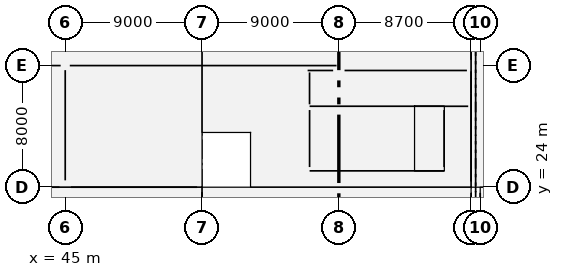
"""IFC4 building model, lengths in metres.
Left out: names, types, materials, properties, quantities, classifications, styles, units other than length and angle.
Written with IfcOpenShell. Run it as: python <this file> out.ifc"""

import sys

from ifc_helpers import new_model, si_unit, direction, frame, frame_2d, origin, origin_2d, place, context, subcontext, project, spatial, rectangle, extrude, element, fill, save


model = new_model("IFC4")
c1 = context("Model", 3, precision=1e-05, world=origin(), true_north=direction((0.0, 1.0)))
c2 = subcontext(c1, "Body", "Model", "MODEL_VIEW")
j1 = project(units=[si_unit("LENGTHUNIT", "METRE"), si_unit("PLANEANGLEUNIT", "RADIAN")], contexts=[c1])
p1 = place(None, origin())
s1 = spatial("IfcSite", under=j1, at=p1, CompositionType="ELEMENT")
p2 = place(p1, origin())
s2 = spatial("IfcBuilding", under=s1, at=p2, CompositionType="ELEMENT")
p3 = place(p2, origin())
s3 = spatial("IfcBuildingStorey", under=s2, at=p3, CompositionType="ELEMENT", Elevation=0.0)
for number, where, z_axis, x_axis in (
    (1, (45.0, 24.0, -0.5), (0.0, 0.0, 1.0), (1.0, 0.0, 0.0)),
    (2, (45.0, 32.0, -0.5), (0.0, 0.0, 1.0), (1.0, 0.0, 0.0)),
):
    element("IfcColumn", number, at=place(p3, frame(where, z_axis=z_axis, x_axis=x_axis)), inside=s3, PredefinedType="COLUMN", context=c2, shape_type="SweptSolid", body=[
        extrude(rectangle(XDim=0.75, YDim=0.75, at=origin_2d()), origin(), (0.0, 0.0, 1.0), 6.8),
    ])
p4 = place(p3, frame((54.0, 24.0, -0.5), z_axis=(0.0, 0.0, 1.0), x_axis=(1.0, 0.0, 0.0)))
e3 = element("IfcColumn", 3, at=p4, inside=s3, PredefinedType="COLUMN", context=c2, shape_type="SweptSolid", body=[
    extrude(rectangle(XDim=0.65, YDim=0.65, at=origin_2d()), origin(), (0.0, 0.0, 1.0), 6.8),
])
p5 = place(p3, frame((54.0, 32.0, -0.5), z_axis=(0.0, 0.0, 1.0), x_axis=(1.0, 0.0, 0.0)))
e4 = element("IfcColumn", 4, at=p5, inside=s3, PredefinedType="COLUMN", context=c2, shape_type="SweptSolid", body=[
    extrude(rectangle(XDim=0.75, YDim=0.75, at=origin_2d()), origin(), (0.0, 0.0, 1.0), 6.8),
])
p6 = place(p3, frame((63.0, 24.0, -0.5), z_axis=(0.0, 0.0, 1.0), x_axis=(1.0, 0.0, 0.0)))
e5 = element("IfcColumn", 5, at=p6, inside=s3, PredefinedType="COLUMN", context=c2, shape_type="SweptSolid", body=[
    extrude(rectangle(XDim=0.65, YDim=0.65, at=origin_2d()), origin(), (0.0, 0.0, 1.0), 6.8),
])
p7 = place(p3, frame((63.0, 32.0, -0.5), z_axis=(0.0, 0.0, 1.0), x_axis=(1.0, 0.0, 0.0)))
e6 = element("IfcColumn", 6, at=p7, inside=s3, PredefinedType="COLUMN", context=c2, shape_type="SweptSolid", body=[
    extrude(rectangle(XDim=0.75, YDim=0.75, at=origin_2d()), origin(), (0.0, 0.0, 1.0), 6.8),
])
for number, where, z_axis, x_axis in (
    (7, (71.7, 24.0, -0.5), (0.0, 0.0, 1.0), (1.0, 0.0, 0.0)),
    (8, (71.7, 32.0, -0.5), (0.0, 0.0, 1.0), (1.0, 0.0, 0.0)),
    (9, (72.3, 24.0, -0.5), (0.0, 0.0, 1.0), (1.0, 0.0, 0.0)),
):
    element("IfcColumn", number, at=place(p3, frame(where, z_axis=z_axis, x_axis=x_axis)), inside=s3, PredefinedType="COLUMN", context=c2, shape_type="SweptSolid", body=[
        extrude(rectangle(XDim=0.55, YDim=0.75, at=origin_2d()), origin(), (0.0, 0.0, 1.0), 6.8),
    ])
p8 = place(p3, frame((36.375, 24.0, 0.0), z_axis=(0.0, 0.0, 1.0), x_axis=(1.0, 0.0, 0.0)))
e10 = element("IfcWall", 10, at=p8, inside=s3, PredefinedType="SOLIDWALL", context=c2, shape_type="SweptSolid", body=[
    extrude(rectangle(XDim=8.25, YDim=0.38, at=frame_2d((4.125, 0.0))), origin(), (0.0, 0.0, 1.0), 5.08),
])
p9 = place(p3, frame((45.375, 24.0, 0.0), z_axis=(0.0, 0.0, 1.0), x_axis=(1.0, 0.0, 0.0)))
e11 = element("IfcWall", 11, at=p9, inside=s3, PredefinedType="SOLIDWALL", context=c2, shape_type="SweptSolid", body=[
    extrude(rectangle(XDim=8.3, YDim=0.38, at=frame_2d((4.15, 0.0))), origin(), (0.0, 0.0, 1.0), 5.08),
])
p10 = place(p9, frame((3.35, 0.0, 3.59)))
e12 = element("IfcOpeningElement", 12, at=p10, cuts=e11, PredefinedType="OPENING", context=c2, shape_type="SweptSolid", body=[
    extrude(rectangle(XDim=1.6, YDim=1.45, at=frame_2d((0.8, 0.725))), frame((0.0, 0.2, 0.0), z_axis=(0.0, -1.0, 0.0), x_axis=(1.0, 0.0, 0.0)), (0.0, 0.0, 1.0), 0.4),
])
p11 = place(p3, frame((71.7, 24.375, 0.0), z_axis=(0.0, 0.0, 1.0), x_axis=(0.0, 1.0, 0.0)))
e13 = element("IfcWall", 13, at=p11, inside=s3, PredefinedType="SOLIDWALL", context=c2, shape_type="SweptSolid", body=[
    extrude(rectangle(XDim=5.8, YDim=0.38, at=frame_2d((2.9, 0.0))), origin(), (0.0, 0.0, 1.0), 5.08),
])
p12 = place(p11, frame((2.825, 0.0, 3.59)))
e14 = element("IfcOpeningElement", 14, at=p12, cuts=e13, PredefinedType="OPENING", context=c2, shape_type="SweptSolid", body=[
    extrude(rectangle(XDim=1.6, YDim=1.45, at=frame_2d((0.8, 0.725))), frame((0.0, 0.2, 0.0), z_axis=(0.0, -1.0, 0.0), x_axis=(1.0, 0.0, 0.0)), (0.0, 0.0, 1.0), 0.4),
])
p13 = place(p3, frame((71.7, 32.375, 0.0), z_axis=(0.0, 0.0, 1.0), x_axis=(0.0, 1.0, 0.0)))
e15 = element("IfcWall", 15, at=p13, inside=s3, PredefinedType="SOLIDWALL", context=c2, shape_type="SweptSolid", body=[
    extrude(rectangle(XDim=7.25, YDim=0.38, at=frame_2d((3.625, 0.0))), origin(), (0.0, 0.0, 1.0), 5.08),
])
p14 = place(p3, frame((54.0, 16.325, 0.0), z_axis=(0.0, 0.0, 1.0), x_axis=(0.0, 1.0, 0.0)))
e16 = element("IfcWall", 16, at=p14, inside=s3, PredefinedType="SOLIDWALL", context=c2, shape_type="SweptSolid", body=[
    extrude(rectangle(XDim=7.35, YDim=0.34, at=frame_2d((3.675, 0.0))), origin(), (0.0, 0.0, 1.0), 5.23),
])
p15 = place(p14, frame((1.55, 0.0, 0.85)))
e17 = element("IfcOpeningElement", 17, at=p15, cuts=e16, PredefinedType="OPENING", context=c2, shape_type="SweptSolid", body=[
    extrude(rectangle(XDim=1.8, YDim=3.15, at=frame_2d((0.9, 1.575))), frame((0.0, 0.18, 0.0), z_axis=(0.0, -1.0, 0.0), x_axis=(1.0, 0.0, 0.0)), (0.0, 0.0, 1.0), 0.36),
])
p16 = place(p14, frame((4.0, 0.0, 0.85)))
e18 = element("IfcOpeningElement", 18, at=p16, cuts=e16, PredefinedType="OPENING", context=c2, shape_type="SweptSolid", body=[
    extrude(rectangle(XDim=1.8, YDim=3.15, at=frame_2d((0.9, 1.575))), frame((0.0, 0.18, 0.0), z_axis=(0.0, -1.0, 0.0), x_axis=(1.0, 0.0, 0.0)), (0.0, 0.0, 1.0), 0.36),
])
p17 = place(p3, frame((71.7, 16.375, 0.0), z_axis=(0.0, 0.0, 1.0), x_axis=(0.0, 1.0, 0.0)))
e19 = element("IfcWall", 19, at=p17, inside=s3, PredefinedType="SOLIDWALL", context=c2, shape_type="SweptSolid", body=[
    extrude(rectangle(XDim=7.25, YDim=0.34, at=frame_2d((3.625, 0.0))), origin(), (0.0, 0.0, 1.0), 4.98),
])
p18 = place(p17, frame((1.517, 0.0, 0.85)))
e20 = element("IfcOpeningElement", 20, at=p18, cuts=e19, PredefinedType="OPENING", context=c2, shape_type="SweptSolid", body=[
    extrude(rectangle(XDim=1.8, YDim=3.15, at=frame_2d((0.9, 1.575))), frame((0.0, 0.18, 0.0), z_axis=(0.0, -1.0, 0.0), x_axis=(1.0, 0.0, 0.0)), (0.0, 0.0, 1.0), 0.36),
])
p19 = place(p17, frame((3.933, 0.0, 0.85)))
e21 = element("IfcOpeningElement", 21, at=p19, cuts=e19, PredefinedType="OPENING", context=c2, shape_type="SweptSolid", body=[
    extrude(rectangle(XDim=1.8, YDim=3.15, at=frame_2d((0.9, 1.575))), frame((0.0, 0.18, 0.0), z_axis=(0.0, -1.0, 0.0), x_axis=(1.0, 0.0, 0.0)), (0.0, 0.0, 1.0), 0.36),
])
p20 = place(p3, frame((72.3, 16.375, 0.0), z_axis=(0.0, 0.0, 1.0), x_axis=(0.0, 1.0, 0.0)))
e22 = element("IfcWall", 22, at=p20, inside=s3, PredefinedType="SOLIDWALL", context=c2, shape_type="SweptSolid", body=[
    extrude(rectangle(XDim=7.25, YDim=0.34, at=frame_2d((3.625, 0.0))), origin(), (0.0, 0.0, 1.0), 5.1),
])
p21 = place(p20, frame((1.517, 0.0, 0.85)))
e23 = element("IfcOpeningElement", 23, at=p21, cuts=e22, PredefinedType="OPENING", context=c2, shape_type="SweptSolid", body=[
    extrude(rectangle(XDim=1.8, YDim=3.15, at=frame_2d((0.9, 1.575))), frame((0.0, 0.18, 0.0), z_axis=(0.0, -1.0, 0.0), x_axis=(1.0, 0.0, 0.0)), (0.0, 0.0, 1.0), 0.36),
])
p22 = place(p20, frame((3.933, 0.0, 0.85)))
e24 = element("IfcOpeningElement", 24, at=p22, cuts=e22, PredefinedType="OPENING", context=c2, shape_type="SweptSolid", body=[
    extrude(rectangle(XDim=1.8, YDim=3.15, at=frame_2d((0.9, 1.575))), frame((0.0, 0.18, 0.0), z_axis=(0.0, -1.0, 0.0), x_axis=(1.0, 0.0, 0.0)), (0.0, 0.0, 1.0), 0.36),
])
p23 = place(p3, frame((61.075, 25.075, -0.5), z_axis=(0.0, 0.0, 1.0), x_axis=(1.0, 0.0, 0.0)))
e25 = element("IfcWall", 25, at=p23, inside=s3, PredefinedType="SOLIDWALL", context=c2, shape_type="SweptSolid", body=[
    extrude(rectangle(XDim=8.85, YDim=0.25, at=frame_2d((4.425, 0.0))), origin(), (0.0, 0.0, 1.0), 6.8),
])
p24 = place(p3, frame((61.075, 29.325, -0.5), z_axis=(0.0, 0.0, 1.0), x_axis=(1.0, 0.0, 0.0)))
e26 = element("IfcWall", 26, at=p24, inside=s3, PredefinedType="SOLIDWALL", context=c2, shape_type="SweptSolid", body=[
    extrude(rectangle(XDim=8.85, YDim=0.25, at=frame_2d((4.425, 0.0))), origin(), (0.0, 0.0, 1.0), 6.8),
])
p25 = place(p24, frame((0.375, 0.0, 0.5)))
e27 = element("IfcOpeningElement", 27, at=p25, cuts=e26, PredefinedType="OPENING", context=c2, shape_type="SweptSolid", body=[
    extrude(rectangle(XDim=1.2, YDim=2.2, at=frame_2d((0.6, 1.1))), frame((0.0, 0.135, 0.0), z_axis=(0.0, -1.0, 0.0), x_axis=(1.0, 0.0, 0.0)), (0.0, 0.0, 1.0), 0.27),
])
p26 = place(p3, frame((61.075, 25.325, -0.5), z_axis=(0.0, 0.0, 1.0), x_axis=(0.0, 1.0, 0.0)))
e28 = element("IfcWall", 28, at=p26, inside=s3, PredefinedType="SOLIDWALL", context=c2, shape_type="SweptSolid", body=[
    extrude(rectangle(XDim=3.75, YDim=0.25, at=frame_2d((1.875, 0.0))), origin(), (0.0, 0.0, 1.0), 6.8),
])
p27 = place(p26, frame((1.1, 0.0, 0.5)))
e29 = element("IfcOpeningElement", 29, at=p27, cuts=e28, PredefinedType="OPENING", context=c2, shape_type="SweptSolid", body=[
    extrude(rectangle(XDim=1.2, YDim=2.2, at=frame_2d((0.6, 1.1))), frame((0.0, 0.135, 0.0), z_axis=(0.0, -1.0, 0.0), x_axis=(1.0, 0.0, 0.0)), (0.0, 0.0, 1.0), 0.27),
])
p28 = place(p3, frame((69.925, 25.325, -0.5), z_axis=(0.0, 0.0, 1.0), x_axis=(0.0, 1.0, 0.0)))
e30 = element("IfcWall", 30, at=p28, inside=s3, PredefinedType="SOLIDWALL", context=c2, shape_type="SweptSolid", body=[
    extrude(rectangle(XDim=3.75, YDim=0.25, at=frame_2d((1.875, 0.0))), origin(), (0.0, 0.0, 1.0), 6.8),
])
p29 = place(p3, frame((45.0, 24.45, 0.0), z_axis=(0.0, 0.0, 1.0), x_axis=(0.0, 1.0, 0.0)))
e31 = element("IfcWall", 31, at=p29, inside=s3, PredefinedType="PARTITIONING", context=c2, shape_type="SweptSolid", body=[
    extrude(rectangle(XDim=7.25, YDim=0.165, at=frame_2d((3.625, 0.0))), origin(), (0.0, 0.0, 1.0), 5.33),
])
p30 = place(p3, frame((36.3, 32.0, 0.0), z_axis=(0.0, 0.0, 1.0), x_axis=(1.0, 0.0, 0.0)))
e32 = element("IfcWall", 32, at=p30, inside=s3, PredefinedType="PARTITIONING", context=c2, shape_type="SweptSolid", body=[
    extrude(rectangle(XDim=8.4, YDim=0.225, at=frame_2d((4.2, 0.0))), origin(), (0.0, 0.0, 1.0), 5.13),
])
p31 = place(p3, frame((45.3, 32.0, 0.0), z_axis=(0.0, 0.0, 1.0), x_axis=(1.0, 0.0, 0.0)))
e33 = element("IfcWall", 33, at=p31, inside=s3, PredefinedType="PARTITIONING", context=c2, shape_type="SweptSolid", body=[
    extrude(rectangle(XDim=17.55, YDim=0.2, at=frame_2d((8.775, 0.0))), origin(), (0.0, 0.0, 1.0), 5.13),
])
p32 = place(p3, frame((61.073, 29.45, 0.0), z_axis=(0.0, 0.0, 1.0), x_axis=(0.0, 1.0, 0.0)))
e34 = element("IfcWall", 34, at=p32, inside=s3, PredefinedType="STANDARD", context=c2, shape_type="SweptSolid", body=[
    extrude(rectangle(XDim=2.1, YDim=0.255, at=frame_2d((1.05, 0.0))), origin(), (0.0, 0.0, 1.0), 5.95),
])
p33 = place(p3, frame((69.925, 29.323, 0.0), z_axis=(0.0, 0.0, 1.0), x_axis=(1.0, 0.0, 0.0)))
e35 = element("IfcWall", 35, at=p33, inside=s3, PredefinedType="STANDARD", context=c2, shape_type="SweptSolid", body=[
    extrude(rectangle(XDim=1.585, YDim=0.255, at=frame_2d((0.792, 0.0))), origin(), (0.0, 0.0, 1.0), 5.95),
])
p34 = place(p3, frame((60.945, 31.677, 0.0), z_axis=(0.0, 0.0, 1.0), x_axis=(1.0, 0.0, 0.0)))
e36 = element("IfcWall", 36, at=p34, inside=s3, PredefinedType="STANDARD", context=c2, shape_type="SweptSolid", body=[
    extrude(rectangle(XDim=1.68, YDim=0.255, at=frame_2d((0.84, 0.0))), origin(), (0.0, 0.0, 1.0), 5.95),
])
p35 = place(p3, frame((63.375, 31.677, 0.0), z_axis=(0.0, 0.0, 1.0), x_axis=(1.0, 0.0, 0.0)))
e37 = element("IfcWall", 37, at=p35, inside=s3, PredefinedType="STANDARD", context=c2, shape_type="SweptSolid", body=[
    extrude(rectangle(XDim=8.05, YDim=0.255, at=frame_2d((4.025, 0.0))), origin(), (0.0, 0.0, 1.0), 5.95),
])
p36 = place(p3, frame((71.7, 31.625, 0.0), z_axis=(0.0, 0.0, 1.0), x_axis=(0.0, -1.0, 0.0)))
e38 = element("IfcWall", 38, at=p36, inside=s3, PredefinedType="SOLIDWALL", context=c2, shape_type="SweptSolid", body=[
    extrude(rectangle(XDim=1.45, YDim=0.38, at=frame_2d((0.725, 0.0))), origin(), (0.0, 0.0, 1.0), 5.08),
])
p37 = place(p36, frame((0.15, 0.0, 0.0)))
e39 = element("IfcOpeningElement", 39, at=p37, cuts=e38, PredefinedType="OPENING", context=c2, shape_type="SweptSolid", body=[
    extrude(rectangle(XDim=1.2, YDim=2.25, at=frame_2d((0.6, 1.125))), frame((0.0, 0.2, 0.0), z_axis=(0.0, -1.0, 0.0), x_axis=(1.0, 0.0, 0.0)), (0.0, 0.0, 1.0), 0.4),
])
p38 = place(p10, origin())
e40 = element("IfcWindow", 40, at=p38, inside=s3, PartitioningType="DOUBLE_PANEL_HORIZONTAL", PredefinedType="WINDOW", context=c2, shape_type="SweptSolid", body=[
    extrude(rectangle(XDim=1.6, YDim=1.45, at=frame_2d((0.8, 0.725))), frame((0.0, 0.03, 0.0), z_axis=(0.0, -1.0, 0.0), x_axis=(1.0, 0.0, 0.0)), (0.0, 0.0, 1.0), 0.06),
])
fill(e12, e40)
p39 = place(p12, origin())
e41 = element("IfcWindow", 41, at=p39, inside=s3, PartitioningType="DOUBLE_PANEL_HORIZONTAL", PredefinedType="WINDOW", context=c2, shape_type="SweptSolid", body=[
    extrude(rectangle(XDim=1.6, YDim=1.45, at=frame_2d((0.8, 0.725))), frame((0.0, 0.03, 0.0), z_axis=(0.0, -1.0, 0.0), x_axis=(1.0, 0.0, 0.0)), (0.0, 0.0, 1.0), 0.06),
])
fill(e14, e41)
p40 = place(p27, origin())
e42 = element("IfcDoor", 42, at=p40, inside=s3, OperationType="SINGLE_SWING_LEFT", PredefinedType="DOOR", context=c2, shape_type="SweptSolid", body=[
    extrude(rectangle(XDim=1.2, YDim=2.2, at=frame_2d((0.6, 1.1))), frame((0.0, 0.025, 0.0), z_axis=(0.0, -1.0, 0.0), x_axis=(1.0, 0.0, 0.0)), (0.0, 0.0, 1.0), 0.05),
])
fill(e29, e42)
p41 = place(p25, origin())
e43 = element("IfcDoor", 43, at=p41, inside=s3, OperationType="SINGLE_SWING_LEFT", PredefinedType="DOOR", context=c2, shape_type="SweptSolid", body=[
    extrude(rectangle(XDim=1.2, YDim=2.2, at=frame_2d((0.6, 1.1))), frame((0.0, 0.025, 0.0), z_axis=(0.0, -1.0, 0.0), x_axis=(1.0, 0.0, 0.0)), (0.0, 0.0, 1.0), 0.05),
])
fill(e27, e43)
p42 = place(p37, origin())
e44 = element("IfcDoor", 44, at=p42, inside=s3, OperationType="SINGLE_SWING_LEFT", PredefinedType="DOOR", context=c2, shape_type="SweptSolid", body=[
    extrude(rectangle(XDim=1.2, YDim=2.25, at=frame_2d((0.6, 1.125))), frame((0.0, 0.025, 0.0), z_axis=(0.0, -1.0, 0.0), x_axis=(1.0, 0.0, 0.0)), (0.0, 0.0, 1.0), 0.05),
])
fill(e39, e44)
save(model, sys.argv[1])
